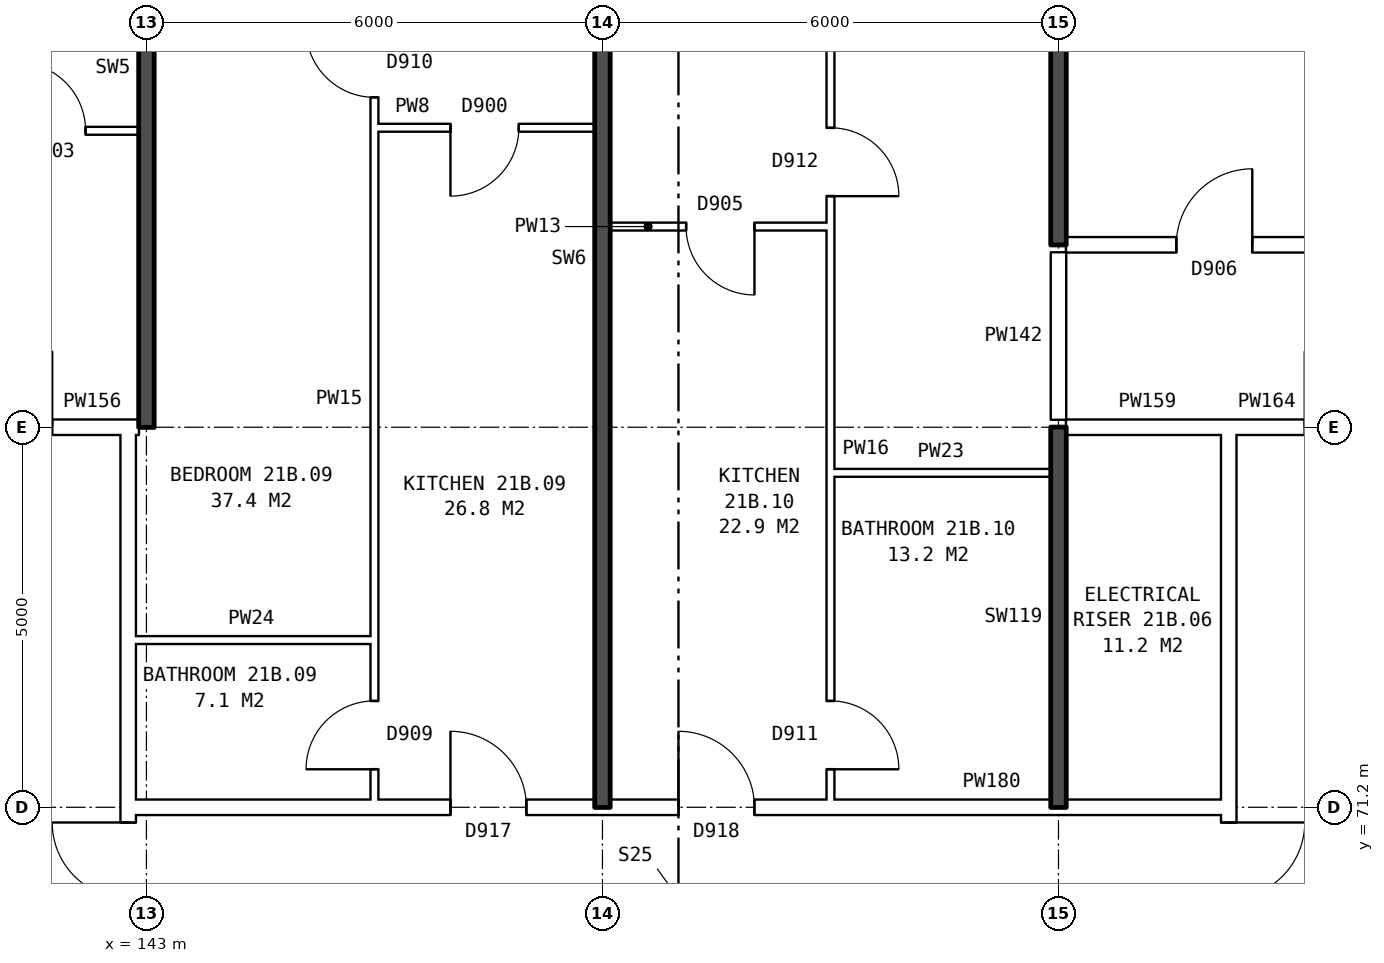
"""IFC4 building model, lengths in metres.
Left out: names, types, materials, properties, quantities, classifications, styles, units other than length and angle.
Written with IfcOpenShell. Run it as: python <this file> out.ifc"""

import sys

from ifc_helpers import new_model, si_unit, direction, frame, frame_2d, origin, place, context, subcontext, project, spatial, rectangle, extrude, element, fill, save


model = new_model("IFC4")
c1 = context("Model", 3, precision=1e-05, world=origin(), true_north=direction((0.0, 1.0)))
c2 = subcontext(c1, "Body", "Model", "MODEL_VIEW")
j1 = project(units=[si_unit("LENGTHUNIT", "METRE"), si_unit("PLANEANGLEUNIT", "RADIAN")], contexts=[c1])
p1 = place(None, origin())
s1 = spatial("IfcSite", under=j1, at=p1, CompositionType="ELEMENT")
p2 = place(p1, origin())
s2 = spatial("IfcBuilding", under=s1, at=p2, CompositionType="ELEMENT")
p3 = place(p2, frame((0.0, 0.0, 77.8)))
s3 = spatial("IfcBuildingStorey", under=s2, at=p3, CompositionType="ELEMENT", Elevation=77.8)
p4 = place(p3, frame((142.76, 63.9, 0.0), z_axis=(0.0, 0.0, 1.0), x_axis=(0.0, 1.0, 0.0)))
e1 = element("IfcWall", 1, at=p4, inside=s3, PredefinedType="PARTITIONING", context=c2, shape_type="SweptSolid", body=[
    extrude(rectangle(XDim=12.2, YDim=0.2, at=frame_2d((6.1, 0.0))), origin(), (0.0, 0.0, 1.0), 2.85),
])
p5 = place(p4, frame((5.1, 0.0, 0.0)))
e2 = element("IfcOpeningElement", 2, at=p5, cuts=e1, PredefinedType="OPENING", context=c2, shape_type="SweptSolid", body=[
    extrude(rectangle(XDim=2.0, YDim=2.1, at=frame_2d((1.0, 1.05))), frame((0.0, 0.11, 0.0), z_axis=(0.0, -1.0, 0.0), x_axis=(1.0, 0.0, 0.0)), (0.0, 0.0, 1.0), 0.22),
])
p6 = place(p3, frame((157.24, 63.9, 0.0), z_axis=(0.0, 0.0, 1.0), x_axis=(0.0, 1.0, 0.0)))
e3 = element("IfcWall", 3, at=p6, inside=s3, PredefinedType="PARTITIONING", context=c2, shape_type="SweptSolid", body=[
    extrude(rectangle(XDim=12.2, YDim=0.2, at=frame_2d((6.1, 0.0))), origin(), (0.0, 0.0, 1.0), 2.85),
])
p7 = place(p6, frame((5.1, 0.0, 0.0)))
e4 = element("IfcOpeningElement", 4, at=p7, cuts=e3, PredefinedType="OPENING", context=c2, shape_type="SweptSolid", body=[
    extrude(rectangle(XDim=2.0, YDim=2.1, at=frame_2d((1.0, 1.05))), frame((0.0, 0.11, 0.0), z_axis=(0.0, -1.0, 0.0), x_axis=(1.0, 0.0, 0.0)), (0.0, 0.0, 1.0), 0.22),
])
p8 = place(p3, frame((142.76, 71.2, 0.0), z_axis=(0.0, 0.0, 1.0), x_axis=(1.0, 0.0, 0.0)))
e5 = element("IfcWall", 5, at=p8, inside=s3, PredefinedType="PARTITIONING", context=c2, shape_type="SweptSolid", body=[
    extrude(rectangle(XDim=14.48, YDim=0.2, at=frame_2d((7.24, 0.0))), origin(), (0.0, 0.0, 1.0), 2.85),
])
p9 = place(p8, frame((4.24, 0.0, 0.0)))
e6 = element("IfcOpeningElement", 6, at=p9, cuts=e5, PredefinedType="OPENING", context=c2, shape_type="SweptSolid", body=[
    extrude(rectangle(XDim=1.0, YDim=2.1, at=frame_2d((0.5, 1.05))), frame((0.0, 0.11, 0.0), z_axis=(0.0, -1.0, 0.0), x_axis=(1.0, 0.0, 0.0)), (0.0, 0.0, 1.0), 0.22),
])
p10 = place(p8, frame((7.24, 0.0, 0.0)))
e7 = element("IfcOpeningElement", 7, at=p10, cuts=e5, PredefinedType="OPENING", context=c2, shape_type="SweptSolid", body=[
    extrude(rectangle(XDim=1.0, YDim=2.1, at=frame_2d((0.5, 1.05))), frame((0.0, 0.11, 0.0), z_axis=(0.0, -1.0, 0.0), x_axis=(1.0, 0.0, 0.0)), (0.0, 0.0, 1.0), 0.22),
])
p11 = place(p3, frame((142.76, 73.4, 0.0), z_axis=(0.0, 0.0, 1.0), x_axis=(1.0, 0.0, 0.0)))
e8 = element("IfcWall", 8, at=p11, inside=s3, PredefinedType="PARTITIONING", context=c2, shape_type="SweptSolid", body=[
    extrude(rectangle(XDim=3.24, YDim=0.1, at=frame_2d((1.62, 0.0))), origin(), (0.0, 0.0, 1.0), 2.85),
])
p12 = place(p3, frame((152.0, 75.6, 0.0), z_axis=(0.0, 0.0, 1.0), x_axis=(1.0, 0.0, 0.0)))
e9 = element("IfcWall", 9, at=p12, inside=s3, PredefinedType="PARTITIONING", context=c2, shape_type="SweptSolid", body=[
    extrude(rectangle(XDim=2.9, YDim=0.1, at=frame_2d((1.45, 0.0))), origin(), (0.0, 0.0, 1.0), 2.85),
])
p13 = place(p3, frame((139.76, 76.2, 0.0), z_axis=(0.0, 0.0, 1.0), x_axis=(1.0, 0.0, 0.0)))
e10 = element("IfcWall", 10, at=p13, inside=s3, PredefinedType="PARTITIONING", context=c2, shape_type="SweptSolid", body=[
    extrude(rectangle(XDim=3.0, YDim=0.2, at=frame_2d((1.5, 0.0))), origin(), (0.0, 0.0, 1.0), 2.85),
])
p14 = place(p13, frame((1.0, 0.0, 0.0)))
e11 = element("IfcOpeningElement", 11, at=p14, cuts=e10, PredefinedType="OPENING", context=c2, shape_type="SweptSolid", body=[
    extrude(rectangle(XDim=1.0, YDim=2.1, at=frame_2d((0.5, 1.05))), frame((0.0, 0.11, 0.0), z_axis=(0.0, -1.0, 0.0), x_axis=(1.0, 0.0, 0.0)), (0.0, 0.0, 1.0), 0.22),
])
p15 = place(p3, frame((142.76, 76.2, 0.0), z_axis=(0.0, 0.0, 1.0), x_axis=(1.0, 0.0, 0.0)))
e12 = element("IfcWall", 12, at=p15, inside=s3, PredefinedType="PARTITIONING", context=c2, shape_type="SweptSolid", body=[
    extrude(rectangle(XDim=0.14, YDim=0.2, at=frame_2d((0.07, 0.0))), origin(), (0.0, 0.0, 1.0), 2.85),
])
p16 = place(p3, frame((155.1, 76.2, 0.0), z_axis=(0.0, 0.0, 1.0), x_axis=(1.0, 0.0, 0.0)))
e13 = element("IfcWall", 13, at=p16, inside=s3, PredefinedType="PARTITIONING", context=c2, shape_type="SweptSolid", body=[
    extrude(rectangle(XDim=2.14, YDim=0.2, at=frame_2d((1.07, 0.0))), origin(), (0.0, 0.0, 1.0), 2.85),
])
p17 = place(p3, frame((157.24, 76.2, 0.0), z_axis=(0.0, 0.0, 1.0), x_axis=(1.0, 0.0, 0.0)))
e14 = element("IfcWall", 14, at=p17, inside=s3, PredefinedType="PARTITIONING", context=c2, shape_type="SweptSolid", body=[
    extrude(rectangle(XDim=3.0, YDim=0.2, at=frame_2d((1.5, 0.0))), origin(), (0.0, 0.0, 1.0), 2.85),
])
p18 = place(p17, frame((1.0, 0.0, 0.0)))
e15 = element("IfcOpeningElement", 15, at=p18, cuts=e14, PredefinedType="OPENING", context=c2, shape_type="SweptSolid", body=[
    extrude(rectangle(XDim=1.0, YDim=2.1, at=frame_2d((0.5, 1.05))), frame((0.0, 0.11, 0.0), z_axis=(0.0, -1.0, 0.0), x_axis=(1.0, 0.0, 0.0)), (0.0, 0.0, 1.0), 0.22),
])
p19 = place(p3, frame((155.1, 78.6, 0.0), z_axis=(0.0, 0.0, 1.0), x_axis=(1.0, 0.0, 0.0)))
e16 = element("IfcWall", 16, at=p19, inside=s3, PredefinedType="PARTITIONING", context=c2, shape_type="SweptSolid", body=[
    extrude(rectangle(XDim=19.79, YDim=0.2, at=frame_2d((9.895, 0.0))), origin(), (0.0, 0.0, 1.0), 2.85),
])
p20 = place(p19, frame((1.45, 0.0, 0.0)))
e17 = element("IfcOpeningElement", 17, at=p20, cuts=e16, PredefinedType="OPENING", context=c2, shape_type="SweptSolid", body=[
    extrude(rectangle(XDim=1.0, YDim=2.1, at=frame_2d((0.5, 1.05))), frame((0.0, 0.11, 0.0), z_axis=(0.0, -1.0, 0.0), x_axis=(1.0, 0.0, 0.0)), (0.0, 0.0, 1.0), 0.22),
])
p21 = place(p19, frame((9.6, 0.0, 0.0)))
e18 = element("IfcOpeningElement", 18, at=p21, cuts=e16, PredefinedType="OPENING", context=c2, shape_type="SweptSolid", body=[
    extrude(rectangle(XDim=1.0, YDim=2.1, at=frame_2d((0.5, 1.05))), frame((0.0, 0.11, 0.0), z_axis=(0.0, -1.0, 0.0), x_axis=(1.0, 0.0, 0.0)), (0.0, 0.0, 1.0), 0.22),
])
p22 = place(p19, frame((13.2, 0.0, 0.0)))
e19 = element("IfcOpeningElement", 19, at=p22, cuts=e16, PredefinedType="OPENING", context=c2, shape_type="SweptSolid", body=[
    extrude(rectangle(XDim=1.0, YDim=2.1, at=frame_2d((0.5, 1.05))), frame((0.0, 0.11, 0.0), z_axis=(0.0, -1.0, 0.0), x_axis=(1.0, 0.0, 0.0)), (0.0, 0.0, 1.0), 0.22),
])
p23 = place(p3, frame((149.1, 78.84, 0.0), z_axis=(0.0, 0.0, 1.0), x_axis=(1.0, 0.0, 0.0)))
e20 = element("IfcWall", 20, at=p23, inside=s3, PredefinedType="PARTITIONING", context=c2, shape_type="SweptSolid", body=[
    extrude(rectangle(XDim=2.9, YDim=0.1, at=frame_2d((1.45, 0.0))), origin(), (0.0, 0.0, 1.0), 2.85),
])
p24 = place(p23, frame((1.0, 0.0, 0.0)))
e21 = element("IfcOpeningElement", 21, at=p24, cuts=e20, PredefinedType="OPENING", context=c2, shape_type="SweptSolid", body=[
    extrude(rectangle(XDim=0.9, YDim=2.1, at=frame_2d((0.45, 1.05))), frame((0.0, 0.06, 0.0), z_axis=(0.0, -1.0, 0.0), x_axis=(1.0, 0.0, 0.0)), (0.0, 0.0, 1.0), 0.12),
])
p25 = place(p3, frame((137.1, 80.1, 0.0), z_axis=(0.0, 0.0, 1.0), x_axis=(1.0, 0.0, 0.0)))
e22 = element("IfcWall", 22, at=p25, inside=s3, PredefinedType="PARTITIONING", context=c2, shape_type="SweptSolid", body=[
    extrude(rectangle(XDim=5.8, YDim=0.1, at=frame_2d((2.9, 0.0))), origin(), (0.0, 0.0, 1.0), 2.85),
])
p26 = place(p25, frame((1.3, 0.0, 0.0)))
e23 = element("IfcOpeningElement", 23, at=p26, cuts=e22, PredefinedType="OPENING", context=c2, shape_type="SweptSolid", body=[
    extrude(rectangle(XDim=0.9, YDim=2.1, at=frame_2d((0.45, 1.05))), frame((0.0, 0.06, 0.0), z_axis=(0.0, -1.0, 0.0), x_axis=(1.0, 0.0, 0.0)), (0.0, 0.0, 1.0), 0.12),
])
p27 = place(p25, frame((4.2, 0.0, 0.0)))
e24 = element("IfcOpeningElement", 24, at=p27, cuts=e22, PredefinedType="OPENING", context=c2, shape_type="SweptSolid", body=[
    extrude(rectangle(XDim=0.9, YDim=2.1, at=frame_2d((0.45, 1.05))), frame((0.0, 0.06, 0.0), z_axis=(0.0, -1.0, 0.0), x_axis=(1.0, 0.0, 0.0)), (0.0, 0.0, 1.0), 0.12),
])
p28 = place(p3, frame((146.0, 80.14, 0.0), z_axis=(0.0, 0.0, 1.0), x_axis=(1.0, 0.0, 0.0)))
e25 = element("IfcWall", 25, at=p28, inside=s3, PredefinedType="PARTITIONING", context=c2, shape_type="SweptSolid", body=[
    extrude(rectangle(XDim=2.9, YDim=0.1, at=frame_2d((1.45, 0.0))), origin(), (0.0, 0.0, 1.0), 2.85),
])
p29 = place(p28, frame((1.0, 0.0, 0.0)))
e26 = element("IfcOpeningElement", 26, at=p29, cuts=e25, PredefinedType="OPENING", context=c2, shape_type="SweptSolid", body=[
    extrude(rectangle(XDim=0.9, YDim=2.1, at=frame_2d((0.45, 1.05))), frame((0.0, 0.06, 0.0), z_axis=(0.0, -1.0, 0.0), x_axis=(1.0, 0.0, 0.0)), (0.0, 0.0, 1.0), 0.12),
])
p30 = place(p3, frame((143.0, 76.2, 0.0), z_axis=(0.0, 0.0, 1.0), x_axis=(0.0, 1.0, 0.0)))
e27 = element("IfcWall", 27, at=p30, inside=s3, PredefinedType="SOLIDWALL", context=c2, shape_type="SweptSolid", body=[
    extrude(rectangle(XDim=9.44, YDim=0.2, at=frame_2d((4.72, 0.0))), origin(), (0.0, 0.0, 1.0), 2.85),
])
p31 = place(p3, frame((146.0, 71.3, 0.0), z_axis=(0.0, 0.0, 1.0), x_axis=(0.0, 1.0, 0.0)))
e28 = element("IfcWall", 28, at=p31, inside=s3, PredefinedType="PARTITIONING", context=c2, shape_type="SweptSolid", body=[
    extrude(rectangle(XDim=14.34, YDim=0.1, at=frame_2d((7.17, 0.0))), origin(), (0.0, 0.0, 1.0), 2.85),
])
p32 = place(p31, frame((9.24, 0.0, 0.0)))
e29 = element("IfcOpeningElement", 29, at=p32, cuts=e28, PredefinedType="OPENING", context=c2, shape_type="SweptSolid", body=[
    extrude(rectangle(XDim=0.9, YDim=2.1, at=frame_2d((0.45, 1.05))), frame((0.0, 0.06, 0.0), z_axis=(0.0, -1.0, 0.0), x_axis=(1.0, 0.0, 0.0)), (0.0, 0.0, 1.0), 0.12),
])
p33 = place(p31, frame((0.4, 0.0, 0.0)))
e30 = element("IfcOpeningElement", 30, at=p33, cuts=e28, PredefinedType="OPENING", context=c2, shape_type="SweptSolid", body=[
    extrude(rectangle(XDim=0.9, YDim=2.1, at=frame_2d((0.45, 1.05))), frame((0.0, 0.06, 0.0), z_axis=(0.0, -1.0, 0.0), x_axis=(1.0, 0.0, 0.0)), (0.0, 0.0, 1.0), 0.12),
])
p34 = place(p3, frame((149.0, 71.2, 0.0), z_axis=(0.0, 0.0, 1.0), x_axis=(0.0, 1.0, 0.0)))
e31 = element("IfcWall", 31, at=p34, inside=s3, PredefinedType="SOLIDWALL", context=c2, shape_type="SweptSolid", body=[
    extrude(rectangle(XDim=14.44, YDim=0.2, at=frame_2d((7.22, 0.0))), origin(), (0.0, 0.0, 1.0), 2.85),
])
p35 = place(p3, frame((152.0, 71.3, 0.0), z_axis=(0.0, 0.0, 1.0), x_axis=(0.0, 1.0, 0.0)))
e32 = element("IfcWall", 32, at=p35, inside=s3, PredefinedType="PARTITIONING", context=c2, shape_type="SweptSolid", body=[
    extrude(rectangle(XDim=14.34, YDim=0.1, at=frame_2d((7.17, 0.0))), origin(), (0.0, 0.0, 1.0), 2.85),
])
p36 = place(p35, frame((7.94, 0.0, 0.0)))
e33 = element("IfcOpeningElement", 33, at=p36, cuts=e32, PredefinedType="OPENING", context=c2, shape_type="SweptSolid", body=[
    extrude(rectangle(XDim=0.9, YDim=2.1, at=frame_2d((0.45, 1.05))), frame((0.0, 0.06, 0.0), z_axis=(0.0, -1.0, 0.0), x_axis=(1.0, 0.0, 0.0)), (0.0, 0.0, 1.0), 0.12),
])
p37 = place(p35, frame((0.4, 0.0, 0.0)))
e34 = element("IfcOpeningElement", 34, at=p37, cuts=e32, PredefinedType="OPENING", context=c2, shape_type="SweptSolid", body=[
    extrude(rectangle(XDim=0.9, YDim=2.1, at=frame_2d((0.45, 1.05))), frame((0.0, 0.06, 0.0), z_axis=(0.0, -1.0, 0.0), x_axis=(1.0, 0.0, 0.0)), (0.0, 0.0, 1.0), 0.12),
])
p38 = place(p3, frame((155.0, 71.2, 0.0), z_axis=(0.0, 0.0, 1.0), x_axis=(0.0, 1.0, 0.0)))
e35 = element("IfcWall", 35, at=p38, inside=s3, PredefinedType="SOLIDWALL", context=c2, shape_type="SweptSolid", body=[
    extrude(rectangle(XDim=5.0, YDim=0.2, at=frame_2d((2.5, 0.0))), origin(), (0.0, 0.0, 1.0), 2.85),
])
p39 = place(p3, frame((155.0, 76.3, 0.0), z_axis=(0.0, 0.0, 1.0), x_axis=(0.0, 1.0, 0.0)))
e36 = element("IfcWall", 36, at=p39, inside=s3, PredefinedType="PARTITIONING", context=c2, shape_type="SweptSolid", body=[
    extrude(rectangle(XDim=2.2, YDim=0.2, at=frame_2d((1.1, 0.0))), origin(), (0.0, 0.0, 1.0), 2.85),
])
p40 = place(p3, frame((155.0, 78.6, 0.0), z_axis=(0.0, 0.0, 1.0), x_axis=(0.0, 1.0, 0.0)))
e37 = element("IfcWall", 37, at=p40, inside=s3, PredefinedType="SOLIDWALL", context=c2, shape_type="SweptSolid", body=[
    extrude(rectangle(XDim=7.04, YDim=0.2, at=frame_2d((3.52, 0.0))), origin(), (0.0, 0.0, 1.0), 2.85),
])
p41 = place(p5, origin())
e38 = element("IfcDoor", 38, at=p41, inside=s3, OperationType="DOUBLE_DOOR_SINGLE_SWING", PredefinedType="DOOR", context=c2, shape_type="SweptSolid", body=[
    extrude(rectangle(XDim=2.0, YDim=2.1, at=frame_2d((1.0, 1.05))), frame((0.0, 0.025, 0.0), z_axis=(0.0, -1.0, 0.0), x_axis=(1.0, 0.0, 0.0)), (0.0, 0.0, 1.0), 0.05),
])
fill(e2, e38)
p42 = place(p7, frame((2.0, 0.0, 0.0), z_axis=(0.0, 0.0, 1.0), x_axis=(-1.0, 0.0, 0.0)))
e39 = element("IfcDoor", 39, at=p42, inside=s3, OperationType="DOUBLE_DOOR_SINGLE_SWING", PredefinedType="DOOR", context=c2, shape_type="SweptSolid", body=[
    extrude(rectangle(XDim=2.0, YDim=2.1, at=frame_2d((1.0, 1.05))), frame((0.0, 0.025, 0.0), z_axis=(0.0, -1.0, 0.0), x_axis=(1.0, 0.0, 0.0)), (0.0, 0.0, 1.0), 0.05),
])
fill(e4, e39)
p43 = place(p27, origin())
e40 = element("IfcDoor", 40, at=p43, inside=s3, OperationType="SINGLE_SWING_LEFT", PredefinedType="DOOR", context=c2, shape_type="SweptSolid", body=[
    extrude(rectangle(XDim=0.9, YDim=2.1, at=frame_2d((0.45, 1.05))), frame((0.0, 0.025, 0.0), z_axis=(0.0, -1.0, 0.0), x_axis=(1.0, 0.0, 0.0)), (0.0, 0.0, 1.0), 0.05),
])
fill(e24, e40)
p44 = place(p32, origin())
e41 = element("IfcDoor", 41, at=p44, inside=s3, OperationType="SINGLE_SWING_RIGHT", PredefinedType="DOOR", context=c2, shape_type="SweptSolid", body=[
    extrude(rectangle(XDim=0.9, YDim=2.1, at=frame_2d((0.45, 1.05))), frame((0.0, 0.025, 0.0), z_axis=(0.0, -1.0, 0.0), x_axis=(1.0, 0.0, 0.0)), (0.0, 0.0, 1.0), 0.05),
])
fill(e29, e41)
p45 = place(p9, origin())
e42 = element("IfcDoor", 42, at=p45, inside=s3, OperationType="SINGLE_SWING_LEFT", PredefinedType="DOOR", context=c2, shape_type="SweptSolid", body=[
    extrude(rectangle(XDim=1.0, YDim=2.1, at=frame_2d((0.5, 1.05))), frame((0.0, 0.025, 0.0), z_axis=(0.0, -1.0, 0.0), x_axis=(1.0, 0.0, 0.0)), (0.0, 0.0, 1.0), 0.05),
])
fill(e6, e42)
p46 = place(p29, frame((0.9, 0.0, 0.0), z_axis=(0.0, 0.0, 1.0), x_axis=(-1.0, 0.0, 0.0)))
e43 = element("IfcDoor", 43, at=p46, inside=s3, OperationType="SINGLE_SWING_RIGHT", PredefinedType="DOOR", context=c2, shape_type="SweptSolid", body=[
    extrude(rectangle(XDim=0.9, YDim=2.1, at=frame_2d((0.45, 1.05))), frame((0.0, 0.025, 0.0), z_axis=(0.0, -1.0, 0.0), x_axis=(1.0, 0.0, 0.0)), (0.0, 0.0, 1.0), 0.05),
])
fill(e26, e43)
p47 = place(p33, origin())
e44 = element("IfcDoor", 44, at=p47, inside=s3, OperationType="SINGLE_SWING_LEFT", PredefinedType="DOOR", context=c2, shape_type="SweptSolid", body=[
    extrude(rectangle(XDim=0.9, YDim=2.1, at=frame_2d((0.45, 1.05))), frame((0.0, 0.025, 0.0), z_axis=(0.0, -1.0, 0.0), x_axis=(1.0, 0.0, 0.0)), (0.0, 0.0, 1.0), 0.05),
])
fill(e30, e44)
p48 = place(p36, frame((0.9, 0.0, 0.0), z_axis=(0.0, 0.0, 1.0), x_axis=(-1.0, 0.0, 0.0)))
e45 = element("IfcDoor", 45, at=p48, inside=s3, OperationType="SINGLE_SWING_RIGHT", PredefinedType="DOOR", context=c2, shape_type="SweptSolid", body=[
    extrude(rectangle(XDim=0.9, YDim=2.1, at=frame_2d((0.45, 1.05))), frame((0.0, 0.025, 0.0), z_axis=(0.0, -1.0, 0.0), x_axis=(1.0, 0.0, 0.0)), (0.0, 0.0, 1.0), 0.05),
])
fill(e33, e45)
p49 = place(p10, origin())
e46 = element("IfcDoor", 46, at=p49, inside=s3, OperationType="SINGLE_SWING_LEFT", PredefinedType="DOOR", context=c2, shape_type="SweptSolid", body=[
    extrude(rectangle(XDim=1.0, YDim=2.1, at=frame_2d((0.5, 1.05))), frame((0.0, 0.025, 0.0), z_axis=(0.0, -1.0, 0.0), x_axis=(1.0, 0.0, 0.0)), (0.0, 0.0, 1.0), 0.05),
])
fill(e7, e46)
p50 = place(p24, frame((0.9, 0.0, 0.0), z_axis=(0.0, 0.0, 1.0), x_axis=(-1.0, 0.0, 0.0)))
e47 = element("IfcDoor", 47, at=p50, inside=s3, OperationType="SINGLE_SWING_LEFT", PredefinedType="DOOR", context=c2, shape_type="SweptSolid", body=[
    extrude(rectangle(XDim=0.9, YDim=2.1, at=frame_2d((0.45, 1.05))), frame((0.0, 0.025, 0.0), z_axis=(0.0, -1.0, 0.0), x_axis=(1.0, 0.0, 0.0)), (0.0, 0.0, 1.0), 0.05),
])
fill(e21, e47)
p51 = place(p37, frame((0.9, 0.0, 0.0), z_axis=(0.0, 0.0, 1.0), x_axis=(-1.0, 0.0, 0.0)))
e48 = element("IfcDoor", 48, at=p51, inside=s3, OperationType="SINGLE_SWING_RIGHT", PredefinedType="DOOR", context=c2, shape_type="SweptSolid", body=[
    extrude(rectangle(XDim=0.9, YDim=2.1, at=frame_2d((0.45, 1.05))), frame((0.0, 0.025, 0.0), z_axis=(0.0, -1.0, 0.0), x_axis=(1.0, 0.0, 0.0)), (0.0, 0.0, 1.0), 0.05),
])
fill(e34, e48)
p52 = place(p20, origin())
e49 = element("IfcDoor", 49, at=p52, inside=s3, OperationType="SINGLE_SWING_RIGHT", PredefinedType="DOOR", context=c2, shape_type="SweptSolid", body=[
    extrude(rectangle(XDim=1.0, YDim=2.1, at=frame_2d((0.5, 1.05))), frame((0.0, 0.025, 0.0), z_axis=(0.0, -1.0, 0.0), x_axis=(1.0, 0.0, 0.0)), (0.0, 0.0, 1.0), 0.05),
])
fill(e17, e49)
save(model, sys.argv[1])
